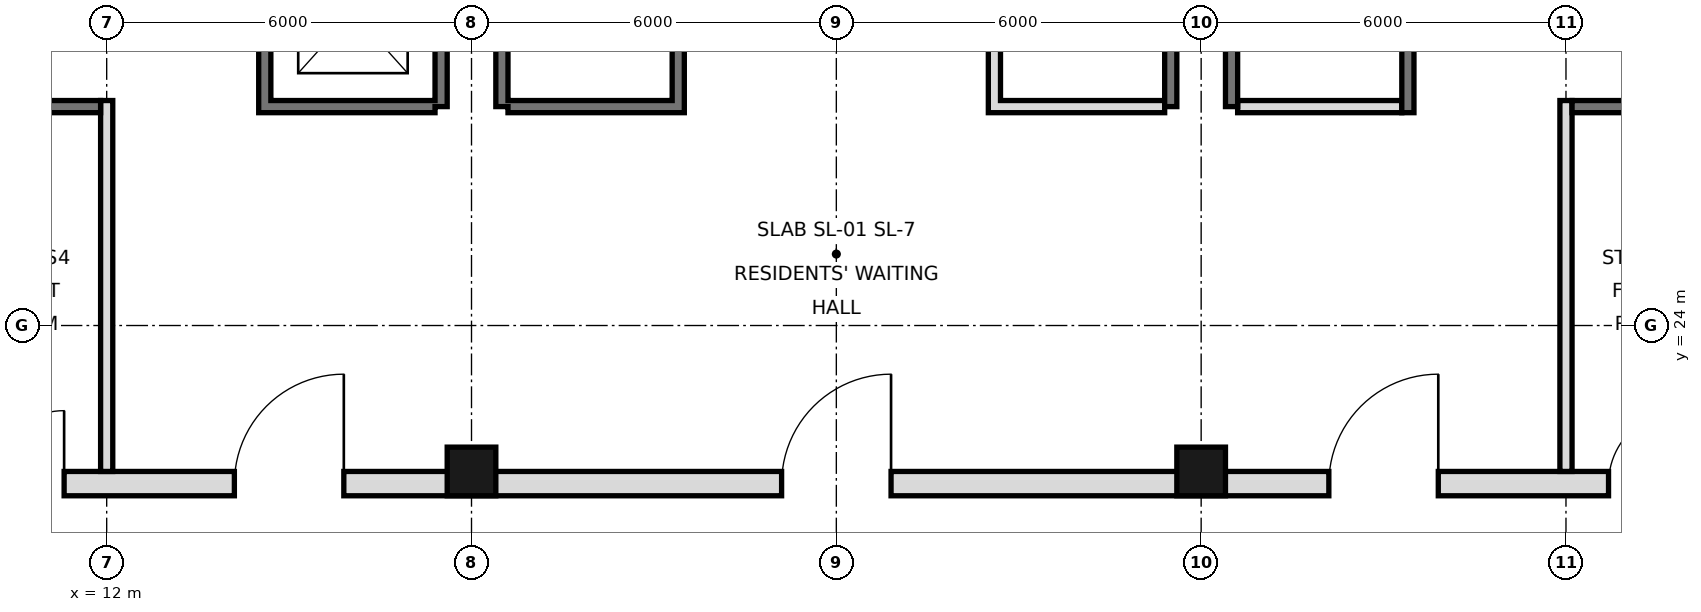
"""IFC4 building model, lengths in metres.
Left out: names, types, materials, properties, quantities, classifications, styles, units other than length and angle.
Written with IfcOpenShell. Run it as: python <this file> out.ifc"""

import sys

from ifc_helpers import new_model, si_unit, direction, frame, frame_2d, origin, origin_2d, place, context, subcontext, project, spatial, rectangle, hollow_rectangle, extrude, element, fill, save


model = new_model("IFC4")
c1 = context("Model", 3, precision=1e-05, world=origin(), true_north=direction((0.0, 1.0)))
c2 = subcontext(c1, "Body", "Model", "MODEL_VIEW")
j1 = project(units=[si_unit("LENGTHUNIT", "METRE"), si_unit("PLANEANGLEUNIT", "RADIAN")], contexts=[c1])
p1 = place(None, origin())
s1 = spatial("IfcSite", under=j1, at=p1, CompositionType="ELEMENT")
p2 = place(p1, origin())
s2 = spatial("IfcBuilding", under=s1, at=p2, CompositionType="ELEMENT")
p3 = place(p2, frame((0.0, 0.0, 151.0)))
s3 = spatial("IfcBuildingStorey", under=s2, at=p3, CompositionType="ELEMENT", Elevation=151.0)
for number, where, z_axis, x_axis in (
    (1, (18.0, 21.6, 0.0), (0.0, 0.0, 1.0), (1.0, 0.0, 0.0)),
    (2, (30.0, 21.6, 0.0), (0.0, 0.0, 1.0), (1.0, 0.0, 0.0)),
):
    element("IfcColumn", number, at=place(p3, frame(where, z_axis=z_axis, x_axis=x_axis)), inside=s3, PredefinedType="COLUMN", context=c2, shape_type="SweptSolid", body=[
        extrude(hollow_rectangle(XDim=0.8, YDim=0.8, WallThickness=0.045, at=origin_2d()), origin(), (0.0, 0.0, 1.0), 3.6),
    ])
for number, where, z_axis, x_axis in (
    (3, (17.5, 27.6, 0.0), (0.0, 0.0, 1.0), (0.0, 1.0, 0.0)),
    (4, (18.5, 27.6, 0.0), (0.0, 0.0, 1.0), (0.0, 1.0, 0.0)),
    (5, (29.5, 27.6, 0.0), (0.0, 0.0, 1.0), (0.0, 1.0, 0.0)),
    (6, (30.5, 27.6, 0.0), (0.0, 0.0, 1.0), (0.0, 1.0, 0.0)),
):
    element("IfcWall", number, at=place(p3, frame(where, z_axis=z_axis, x_axis=x_axis)), inside=s3, PredefinedType="SOLIDWALL", context=c2, shape_type="SweptSolid", body=[
        extrude(rectangle(XDim=17.5, YDim=0.2, at=frame_2d((8.75, 0.0))), origin(), (0.0, 0.0, 1.0), 3.42),
    ])
p4 = place(p3, frame((5.6, 21.4, 0.0), z_axis=(0.0, 0.0, 1.0), x_axis=(1.0, 0.0, 0.0)))
e7 = element("IfcWall", 7, at=p4, inside=s3, PredefinedType="SOLIDWALL", context=c2, shape_type="SweptSolid", body=[
    extrude(rectangle(XDim=36.8, YDim=0.4, at=frame_2d((18.4, 0.0))), origin(), (0.0, 0.0, 1.0), 3.42),
])
p5 = place(p4, frame((8.5, 0.0, 0.0)))
e8 = element("IfcOpeningElement", 8, at=p5, cuts=e7, PredefinedType="OPENING", context=c2, shape_type="SweptSolid", body=[
    extrude(rectangle(XDim=1.8, YDim=2.1, at=frame_2d((0.9, 1.05))), frame((0.0, 0.21, 0.0), z_axis=(0.0, -1.0, 0.0), x_axis=(1.0, 0.0, 0.0)), (0.0, 0.0, 1.0), 0.42),
])
p6 = place(p4, frame((17.5, 0.0, 0.0)))
e9 = element("IfcOpeningElement", 9, at=p6, cuts=e7, PredefinedType="OPENING", context=c2, shape_type="SweptSolid", body=[
    extrude(rectangle(XDim=1.8, YDim=2.1, at=frame_2d((0.9, 1.05))), frame((0.0, 0.21, 0.0), z_axis=(0.0, -1.0, 0.0), x_axis=(1.0, 0.0, 0.0)), (0.0, 0.0, 1.0), 0.42),
])
p7 = place(p4, frame((26.5, 0.0, 0.0)))
e10 = element("IfcOpeningElement", 10, at=p7, cuts=e7, PredefinedType="OPENING", context=c2, shape_type="SweptSolid", body=[
    extrude(rectangle(XDim=1.8, YDim=2.1, at=frame_2d((0.9, 1.05))), frame((0.0, 0.21, 0.0), z_axis=(0.0, -1.0, 0.0), x_axis=(1.0, 0.0, 0.0)), (0.0, 0.0, 1.0), 0.42),
])
p8 = place(p4, frame((4.5, 0.0, 0.0)))
e11 = element("IfcOpeningElement", 11, at=p8, cuts=e7, PredefinedType="OPENING", context=c2, shape_type="SweptSolid", body=[
    extrude(rectangle(XDim=1.2, YDim=2.1, at=frame_2d((0.6, 1.05))), frame((0.0, 0.21, 0.0), z_axis=(0.0, -1.0, 0.0), x_axis=(1.0, 0.0, 0.0)), (0.0, 0.0, 1.0), 0.42),
])
p9 = place(p4, frame((31.1, 0.0, 0.0)))
e12 = element("IfcOpeningElement", 12, at=p9, cuts=e7, PredefinedType="OPENING", context=c2, shape_type="SweptSolid", body=[
    extrude(rectangle(XDim=1.2, YDim=2.1, at=frame_2d((0.6, 1.05))), frame((0.0, 0.21, 0.0), z_axis=(0.0, -1.0, 0.0), x_axis=(1.0, 0.0, 0.0)), (0.0, 0.0, 1.0), 0.42),
])
p10 = place(p3, frame((12.0, 21.6, 0.0), z_axis=(0.0, 0.0, 1.0), x_axis=(0.0, 1.0, 0.0)))
e13 = element("IfcWall", 13, at=p10, inside=s3, PredefinedType="PARTITIONING", context=c2, shape_type="SweptSolid", body=[
    extrude(rectangle(XDim=6.1, YDim=0.2, at=frame_2d((3.05, 0.0))), origin(), (0.0, 0.0, 1.0), 3.42),
])
p11 = place(p3, frame((14.6, 27.5, 0.0), z_axis=(0.0, 0.0, 1.0), x_axis=(0.0, 1.0, 0.0)))
e14 = element("IfcWall", 14, at=p11, inside=s3, PredefinedType="SOLIDWALL", context=c2, shape_type="SweptSolid", body=[
    extrude(rectangle(XDim=17.5, YDim=0.2, at=frame_2d((8.75, 0.0))), origin(), (0.0, 0.0, 1.0), 3.42),
])
p12 = place(p11, frame((1.1, 0.0, 0.0)))
e15 = element("IfcOpeningElement", 15, at=p12, cuts=e14, PredefinedType="OPENING", context=c2, shape_type="SweptSolid", body=[
    extrude(rectangle(XDim=1.1, YDim=2.1, at=frame_2d((0.55, 1.05))), frame((0.0, 0.11, 0.0), z_axis=(0.0, -1.0, 0.0), x_axis=(1.0, 0.0, 0.0)), (0.0, 0.0, 1.0), 0.22),
])
p13 = place(p11, frame((4.2, 0.0, 0.0)))
e16 = element("IfcOpeningElement", 16, at=p13, cuts=e14, PredefinedType="OPENING", context=c2, shape_type="SweptSolid", body=[
    extrude(rectangle(XDim=1.1, YDim=2.1, at=frame_2d((0.55, 1.05))), frame((0.0, 0.11, 0.0), z_axis=(0.0, -1.0, 0.0), x_axis=(1.0, 0.0, 0.0)), (0.0, 0.0, 1.0), 0.22),
])
p14 = place(p11, frame((15.4, 0.0, 0.0)))
e17 = element("IfcOpeningElement", 17, at=p14, cuts=e14, PredefinedType="OPENING", context=c2, shape_type="SweptSolid", body=[
    extrude(rectangle(XDim=1.1, YDim=2.1, at=frame_2d((0.55, 1.05))), frame((0.0, 0.11, 0.0), z_axis=(0.0, -1.0, 0.0), x_axis=(1.0, 0.0, 0.0)), (0.0, 0.0, 1.0), 0.22),
])
p15 = place(p11, frame((9.9, 0.0, 0.0)))
e18 = element("IfcOpeningElement", 18, at=p15, cuts=e14, PredefinedType="OPENING", context=c2, shape_type="SweptSolid", body=[
    extrude(rectangle(XDim=0.9, YDim=2.1, at=frame_2d((0.45, 1.05))), frame((0.0, 0.11, 0.0), z_axis=(0.0, -1.0, 0.0), x_axis=(1.0, 0.0, 0.0)), (0.0, 0.0, 1.0), 0.22),
])
p16 = place(p3, frame((21.4, 27.5, 0.0), z_axis=(0.0, 0.0, 1.0), x_axis=(0.0, 1.0, 0.0)))
e19 = element("IfcWall", 19, at=p16, inside=s3, PredefinedType="SOLIDWALL", context=c2, shape_type="SweptSolid", body=[
    extrude(rectangle(XDim=17.5, YDim=0.2, at=frame_2d((8.75, 0.0))), origin(), (0.0, 0.0, 1.0), 3.42),
])
p17 = place(p16, frame((9.8, 0.0, 0.0)))
e20 = element("IfcOpeningElement", 20, at=p17, cuts=e19, PredefinedType="OPENING", context=c2, shape_type="SweptSolid", body=[
    extrude(rectangle(XDim=1.0, YDim=2.1, at=frame_2d((0.5, 1.05))), frame((0.0, 0.11, 0.0), z_axis=(0.0, -1.0, 0.0), x_axis=(1.0, 0.0, 0.0)), (0.0, 0.0, 1.0), 0.22),
])
p18 = place(p16, frame((7.4, 0.0, 0.0)))
e21 = element("IfcOpeningElement", 21, at=p18, cuts=e19, PredefinedType="OPENING", context=c2, shape_type="SweptSolid", body=[
    extrude(rectangle(XDim=0.9, YDim=2.1, at=frame_2d((0.45, 1.05))), frame((0.0, 0.11, 0.0), z_axis=(0.0, -1.0, 0.0), x_axis=(1.0, 0.0, 0.0)), (0.0, 0.0, 1.0), 0.22),
])
p19 = place(p3, frame((26.6, 27.5, 0.0), z_axis=(0.0, 0.0, 1.0), x_axis=(0.0, 1.0, 0.0)))
e22 = element("IfcWall", 22, at=p19, inside=s3, PredefinedType="SOLIDWALL", context=c2, shape_type="SweptSolid", body=[
    extrude(rectangle(XDim=17.5, YDim=0.2, at=frame_2d((8.75, 0.0))), origin(), (0.0, 0.0, 1.0), 3.42),
])
p20 = place(p19, frame((4.3, 0.0, 0.0)))
e23 = element("IfcOpeningElement", 23, at=p20, cuts=e22, PredefinedType="OPENING", context=c2, shape_type="SweptSolid", body=[
    extrude(rectangle(XDim=0.9, YDim=2.1, at=frame_2d((0.45, 1.05))), frame((0.0, 0.11, 0.0), z_axis=(0.0, -1.0, 0.0), x_axis=(1.0, 0.0, 0.0)), (0.0, 0.0, 1.0), 0.22),
])
p21 = place(p19, frame((10.35, 0.0, 0.0)))
e24 = element("IfcOpeningElement", 24, at=p21, cuts=e22, PredefinedType="OPENING", context=c2, shape_type="SweptSolid", body=[
    extrude(rectangle(XDim=1.0, YDim=2.1, at=frame_2d((0.5, 1.05))), frame((0.0, 0.11, 0.0), z_axis=(0.0, -1.0, 0.0), x_axis=(1.0, 0.0, 0.0)), (0.0, 0.0, 1.0), 0.22),
])
p22 = place(p19, frame((14.575, 0.0, 0.0)))
e25 = element("IfcOpeningElement", 25, at=p22, cuts=e22, PredefinedType="OPENING", context=c2, shape_type="SweptSolid", body=[
    extrude(rectangle(XDim=1.0, YDim=2.1, at=frame_2d((0.5, 1.05))), frame((0.0, 0.11, 0.0), z_axis=(0.0, -1.0, 0.0), x_axis=(1.0, 0.0, 0.0)), (0.0, 0.0, 1.0), 0.22),
])
p23 = place(p3, frame((33.4, 27.5, 0.0), z_axis=(0.0, 0.0, 1.0), x_axis=(0.0, 1.0, 0.0)))
e26 = element("IfcWall", 26, at=p23, inside=s3, PredefinedType="SOLIDWALL", context=c2, shape_type="SweptSolid", body=[
    extrude(rectangle(XDim=17.5, YDim=0.2, at=frame_2d((8.75, 0.0))), origin(), (0.0, 0.0, 1.0), 3.42),
])
p24 = place(p23, frame((15.4, 0.0, 0.0)))
e27 = element("IfcOpeningElement", 27, at=p24, cuts=e26, PredefinedType="OPENING", context=c2, shape_type="SweptSolid", body=[
    extrude(rectangle(XDim=1.1, YDim=2.1, at=frame_2d((0.55, 1.05))), frame((0.0, 0.11, 0.0), z_axis=(0.0, -1.0, 0.0), x_axis=(1.0, 0.0, 0.0)), (0.0, 0.0, 1.0), 0.22),
])
p25 = place(p23, frame((2.7, 0.0, 0.0)))
e28 = element("IfcOpeningElement", 28, at=p25, cuts=e26, PredefinedType="OPENING", context=c2, shape_type="SweptSolid", body=[
    extrude(rectangle(XDim=1.0, YDim=2.1, at=frame_2d((0.5, 1.05))), frame((0.0, 0.11, 0.0), z_axis=(0.0, -1.0, 0.0), x_axis=(1.0, 0.0, 0.0)), (0.0, 0.0, 1.0), 0.22),
])
p26 = place(p23, frame((9.9, 0.0, 0.0)))
e29 = element("IfcOpeningElement", 29, at=p26, cuts=e26, PredefinedType="OPENING", context=c2, shape_type="SweptSolid", body=[
    extrude(rectangle(XDim=0.9, YDim=2.1, at=frame_2d((0.45, 1.05))), frame((0.0, 0.11, 0.0), z_axis=(0.0, -1.0, 0.0), x_axis=(1.0, 0.0, 0.0)), (0.0, 0.0, 1.0), 0.22),
])
p27 = place(p3, frame((36.0, 21.6, 0.0), z_axis=(0.0, 0.0, 1.0), x_axis=(0.0, 1.0, 0.0)))
e30 = element("IfcWall", 30, at=p27, inside=s3, PredefinedType="PARTITIONING", context=c2, shape_type="SweptSolid", body=[
    extrude(rectangle(XDim=6.1, YDim=0.2, at=frame_2d((3.05, 0.0))), origin(), (0.0, 0.0, 1.0), 3.42),
])
for number, where, z_axis, x_axis in (
    (31, (14.7, 27.6, 0.0), (0.0, 0.0, 1.0), (1.0, 0.0, 0.0)),
    (32, (18.6, 27.6, 0.0), (0.0, 0.0, 1.0), (1.0, 0.0, 0.0)),
    (33, (26.7, 27.6, 0.0), (0.0, 0.0, 1.0), (1.0, 0.0, 0.0)),
):
    element("IfcWall", number, at=place(p3, frame(where, z_axis=z_axis, x_axis=x_axis)), inside=s3, PredefinedType="SOLIDWALL", context=c2, shape_type="SweptSolid", body=[
        extrude(rectangle(XDim=2.7, YDim=0.2, at=frame_2d((1.35, 0.0))), origin(), (0.0, 0.0, 1.0), 3.42),
    ])
p28 = place(p3, frame((30.6, 27.6, 0.0), z_axis=(0.0, 0.0, 1.0), x_axis=(1.0, 0.0, 0.0)))
e34 = element("IfcWall", 34, at=p28, inside=s3, PredefinedType="PARTITIONING", context=c2, shape_type="SweptSolid", body=[
    extrude(rectangle(XDim=2.7, YDim=0.2, at=frame_2d((1.35, 0.0))), origin(), (0.0, 0.0, 1.0), 3.42),
])
for number, where, z_axis, x_axis in (
    (35, (36.1, 27.6, 0.0), (0.0, 0.0, 1.0), (1.0, 0.0, 0.0)),
    (36, (6.6, 27.6, 0.0), (0.0, 0.0, 1.0), (1.0, 0.0, 0.0)),
):
    element("IfcWall", number, at=place(p3, frame(where, z_axis=z_axis, x_axis=x_axis)), inside=s3, PredefinedType="SOLIDWALL", context=c2, shape_type="SweptSolid", body=[
        extrude(rectangle(XDim=5.3, YDim=0.2, at=frame_2d((2.65, 0.0))), origin(), (0.0, 0.0, 1.0), 3.42),
    ])
p29 = place(p5, frame((1.8, 0.0, 0.0), z_axis=(0.0, 0.0, 1.0), x_axis=(-1.0, 0.0, 0.0)))
e37 = element("IfcDoor", 37, at=p29, inside=s3, OperationType="SINGLE_SWING_LEFT", PredefinedType="DOOR", context=c2, shape_type="SweptSolid", body=[
    extrude(rectangle(XDim=1.8, YDim=2.1, at=frame_2d((0.9, 1.05))), frame((0.0, 0.025, 0.0), z_axis=(0.0, -1.0, 0.0), x_axis=(1.0, 0.0, 0.0)), (0.0, 0.0, 1.0), 0.05),
])
fill(e8, e37)
p30 = place(p6, frame((1.8, 0.0, 0.0), z_axis=(0.0, 0.0, 1.0), x_axis=(-1.0, 0.0, 0.0)))
e38 = element("IfcDoor", 38, at=p30, inside=s3, OperationType="SINGLE_SWING_LEFT", PredefinedType="DOOR", context=c2, shape_type="SweptSolid", body=[
    extrude(rectangle(XDim=1.8, YDim=2.1, at=frame_2d((0.9, 1.05))), frame((0.0, 0.025, 0.0), z_axis=(0.0, -1.0, 0.0), x_axis=(1.0, 0.0, 0.0)), (0.0, 0.0, 1.0), 0.05),
])
fill(e9, e38)
p31 = place(p7, frame((1.8, 0.0, 0.0), z_axis=(0.0, 0.0, 1.0), x_axis=(-1.0, 0.0, 0.0)))
e39 = element("IfcDoor", 39, at=p31, inside=s3, OperationType="SINGLE_SWING_LEFT", PredefinedType="DOOR", context=c2, shape_type="SweptSolid", body=[
    extrude(rectangle(XDim=1.8, YDim=2.1, at=frame_2d((0.9, 1.05))), frame((0.0, 0.025, 0.0), z_axis=(0.0, -1.0, 0.0), x_axis=(1.0, 0.0, 0.0)), (0.0, 0.0, 1.0), 0.05),
])
fill(e10, e39)
p32 = place(p8, frame((1.2, 0.0, 0.0), z_axis=(0.0, 0.0, 1.0), x_axis=(-1.0, 0.0, 0.0)))
e40 = element("IfcDoor", 40, at=p32, inside=s3, OperationType="SINGLE_SWING_LEFT", PredefinedType="DOOR", context=c2, shape_type="SweptSolid", body=[
    extrude(rectangle(XDim=1.2, YDim=2.1, at=frame_2d((0.6, 1.05))), frame((0.0, 0.025, 0.0), z_axis=(0.0, -1.0, 0.0), x_axis=(1.0, 0.0, 0.0)), (0.0, 0.0, 1.0), 0.05),
])
fill(e11, e40)
p33 = place(p9, frame((1.2, 0.0, 0.0), z_axis=(0.0, 0.0, 1.0), x_axis=(-1.0, 0.0, 0.0)))
e41 = element("IfcDoor", 41, at=p33, inside=s3, OperationType="SINGLE_SWING_LEFT", PredefinedType="DOOR", context=c2, shape_type="SweptSolid", body=[
    extrude(rectangle(XDim=1.2, YDim=2.1, at=frame_2d((0.6, 1.05))), frame((0.0, 0.025, 0.0), z_axis=(0.0, -1.0, 0.0), x_axis=(1.0, 0.0, 0.0)), (0.0, 0.0, 1.0), 0.05),
])
fill(e12, e41)
save(model, sys.argv[1])
